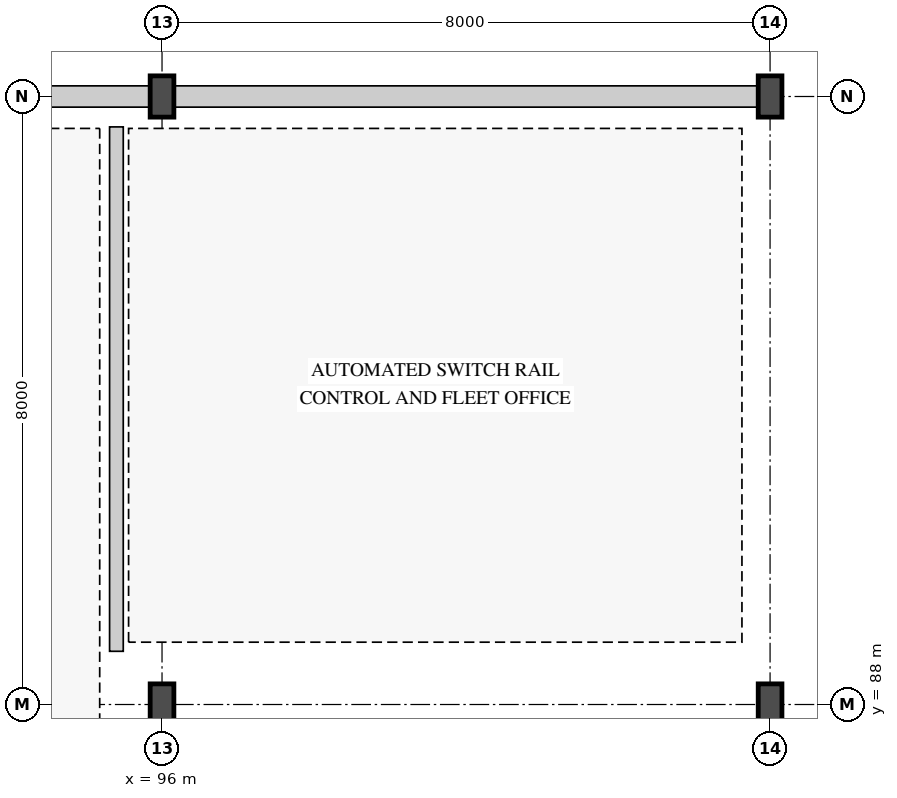
"""IFC4 building model, lengths in metres.
Left out: names, types, materials, properties, quantities, classifications, styles, units other than length and angle.
Written with IfcOpenShell. Run it as: python <this file> out.ifc"""

import sys

from ifc_helpers import new_model, si_unit, direction, frame, frame_2d, origin, origin_2d, place, context, subcontext, project, spatial, rectangle, i_section, extrude, element, fill, save


model = new_model("IFC4")
c1 = context("Model", 3, precision=1e-05, world=origin(), true_north=direction((0.0, 1.0)))
c2 = subcontext(c1, "Body", "Model", "MODEL_VIEW")
j1 = project(units=[si_unit("LENGTHUNIT", "METRE"), si_unit("PLANEANGLEUNIT", "RADIAN")], contexts=[c1])
p1 = place(None, origin())
s1 = spatial("IfcSite", under=j1, at=p1, CompositionType="ELEMENT")
p2 = place(p1, origin())
s2 = spatial("IfcBuilding", under=s1, at=p2, CompositionType="ELEMENT")
p3 = place(p2, frame((0.0, 0.0, 9.6)))
s3 = spatial("IfcBuildingStorey", under=s2, at=p3, CompositionType="ELEMENT", Elevation=9.6)
for number, where, z_axis, x_axis in (
    (1, (96.0, 88.0, 0.0), (0.0, 0.0, 1.0), (1.0, 0.0, 0.0)),
    (2, (96.0, 96.0, 0.0), (0.0, 0.0, 1.0), (1.0, 0.0, 0.0)),
    (3, (104.0, 88.0, 0.0), (0.0, 0.0, 1.0), (1.0, 0.0, 0.0)),
    (4, (104.0, 96.0, 0.0), (0.0, 0.0, 1.0), (1.0, 0.0, 0.0)),
):
    element("IfcColumn", number, at=place(p3, frame(where, z_axis=z_axis, x_axis=x_axis)), inside=s3, PredefinedType="COLUMN", context=c2, shape_type="SweptSolid", body=[
        extrude(i_section(OverallWidth=0.312, OverallDepth=0.543, WebThickness=0.013, FlangeThickness=0.02, FilletRadius=0.016, at=origin_2d()), origin(), (0.0, 0.0, 1.0), 5.4),
    ])
p4 = place(p3, frame((80.006, 96.0, 0.0), z_axis=(0.0, 0.0, 1.0), x_axis=(1.0, 0.0, 0.0)))
e5 = element("IfcWall", 5, at=p4, inside=s3, PredefinedType="STANDARD", context=c2, shape_type="SweptSolid", body=[
    extrude(rectangle(XDim=15.988, YDim=0.28, at=frame_2d((7.994, 0.0))), origin(), (0.0, 0.0, 1.0), 4.39),
])
p5 = place(p4, frame((3.287, 0.0, 0.78)))
e6 = element("IfcOpeningElement", 6, at=p5, cuts=e5, PredefinedType="OPENING", context=c2, shape_type="SweptSolid", body=[
    extrude(rectangle(XDim=1.1, YDim=2.2, at=frame_2d((0.55, 1.1))), frame((0.0, 0.15, 0.0), z_axis=(0.0, -1.0, 0.0), x_axis=(1.0, 0.0, 0.0)), (0.0, 0.0, 1.0), 0.3),
])
p6 = place(p4, frame((7.269, 0.0, 0.78)))
e7 = element("IfcOpeningElement", 7, at=p6, cuts=e5, PredefinedType="OPENING", context=c2, shape_type="SweptSolid", body=[
    extrude(rectangle(XDim=1.45, YDim=2.3, at=frame_2d((0.725, 1.15))), frame((0.0, 0.15, 0.0), z_axis=(0.0, -1.0, 0.0), x_axis=(1.0, 0.0, 0.0)), (0.0, 0.0, 1.0), 0.3),
])
p7 = place(p4, frame((11.676, 0.0, 0.78)))
e8 = element("IfcOpeningElement", 8, at=p7, cuts=e5, PredefinedType="OPENING", context=c2, shape_type="SweptSolid", body=[
    extrude(rectangle(XDim=0.95, YDim=2.6, at=frame_2d((0.475, 1.3))), frame((0.0, 0.15, 0.0), z_axis=(0.0, -1.0, 0.0), x_axis=(1.0, 0.0, 0.0)), (0.0, 0.0, 1.0), 0.3),
])
p8 = place(p3, frame((96.006, 96.0, 0.0), z_axis=(0.0, 0.0, 1.0), x_axis=(1.0, 0.0, 0.0)))
e9 = element("IfcWall", 9, at=p8, inside=s3, PredefinedType="STANDARD", context=c2, shape_type="SweptSolid", body=[
    extrude(rectangle(XDim=7.988, YDim=0.28, at=frame_2d((3.994, 0.0))), origin(), (0.0, 0.0, 1.0), 4.548),
])
p9 = place(p8, frame((1.971, 0.0, 0.78)))
e10 = element("IfcOpeningElement", 10, at=p9, cuts=e9, PredefinedType="OPENING", context=c2, shape_type="SweptSolid", body=[
    extrude(rectangle(XDim=0.85, YDim=2.4, at=frame_2d((0.425, 1.2))), frame((0.0, 0.15, 0.0), z_axis=(0.0, -1.0, 0.0), x_axis=(1.0, 0.0, 0.0)), (0.0, 0.0, 1.0), 0.3),
])
p10 = place(p8, frame((4.742, 0.0, 0.78)))
e11 = element("IfcOpeningElement", 11, at=p10, cuts=e9, PredefinedType="OPENING", context=c2, shape_type="SweptSolid", body=[
    extrude(rectangle(XDim=1.7, YDim=1.95, at=frame_2d((0.85, 0.975))), frame((0.0, 0.15, 0.0), z_axis=(0.0, -1.0, 0.0), x_axis=(1.0, 0.0, 0.0)), (0.0, 0.0, 1.0), 0.3),
])
p11 = place(p3, frame((95.4, 88.7, 0.0), z_axis=(0.0, 0.0, 1.0), x_axis=(0.0, 1.0, 0.0)))
e12 = element("IfcWall", 12, at=p11, inside=s3, PredefinedType="PARTITIONING", context=c2, shape_type="SweptSolid", body=[
    extrude(rectangle(XDim=6.9, YDim=0.18, at=frame_2d((3.45, 0.0))), origin(), (0.0, 0.0, 1.0), 4.685),
])
p12 = place(p11, frame((2.5, 0.0, 0.0)))
e13 = element("IfcOpeningElement", 13, at=p12, cuts=e12, PredefinedType="OPENING", context=c2, shape_type="SweptSolid", body=[
    extrude(rectangle(XDim=1.1, YDim=2.2, at=frame_2d((0.55, 1.1))), frame((0.0, 0.1, 0.0), z_axis=(0.0, -1.0, 0.0), x_axis=(1.0, 0.0, 0.0)), (0.0, 0.0, 1.0), 0.2),
])
p13 = place(p9, origin())
e14 = element("IfcWindow", 14, at=p13, inside=s3, PartitioningType="SINGLE_PANEL", PredefinedType="WINDOW", context=c2, shape_type="SweptSolid", body=[
    extrude(rectangle(XDim=0.85, YDim=2.4, at=frame_2d((0.425, 1.2))), frame((0.0, 0.03, 0.0), z_axis=(0.0, -1.0, 0.0), x_axis=(1.0, 0.0, 0.0)), (0.0, 0.0, 1.0), 0.06),
])
fill(e10, e14)
p14 = place(p10, origin())
e15 = element("IfcWindow", 15, at=p14, inside=s3, PartitioningType="SINGLE_PANEL", PredefinedType="WINDOW", context=c2, shape_type="SweptSolid", body=[
    extrude(rectangle(XDim=1.7, YDim=1.95, at=frame_2d((0.85, 0.975))), frame((0.0, 0.03, 0.0), z_axis=(0.0, -1.0, 0.0), x_axis=(1.0, 0.0, 0.0)), (0.0, 0.0, 1.0), 0.06),
])
fill(e11, e15)
p15 = place(p12, origin())
e16 = element("IfcDoor", 16, at=p15, inside=s3, OperationType="SINGLE_SWING_RIGHT", PredefinedType="DOOR", context=c2, shape_type="SweptSolid", body=[
    extrude(rectangle(XDim=1.1, YDim=2.2, at=frame_2d((0.55, 1.1))), frame((0.0, 0.025, 0.0), z_axis=(0.0, -1.0, 0.0), x_axis=(1.0, 0.0, 0.0)), (0.0, 0.0, 1.0), 0.05),
])
fill(e13, e16)
save(model, sys.argv[1])
